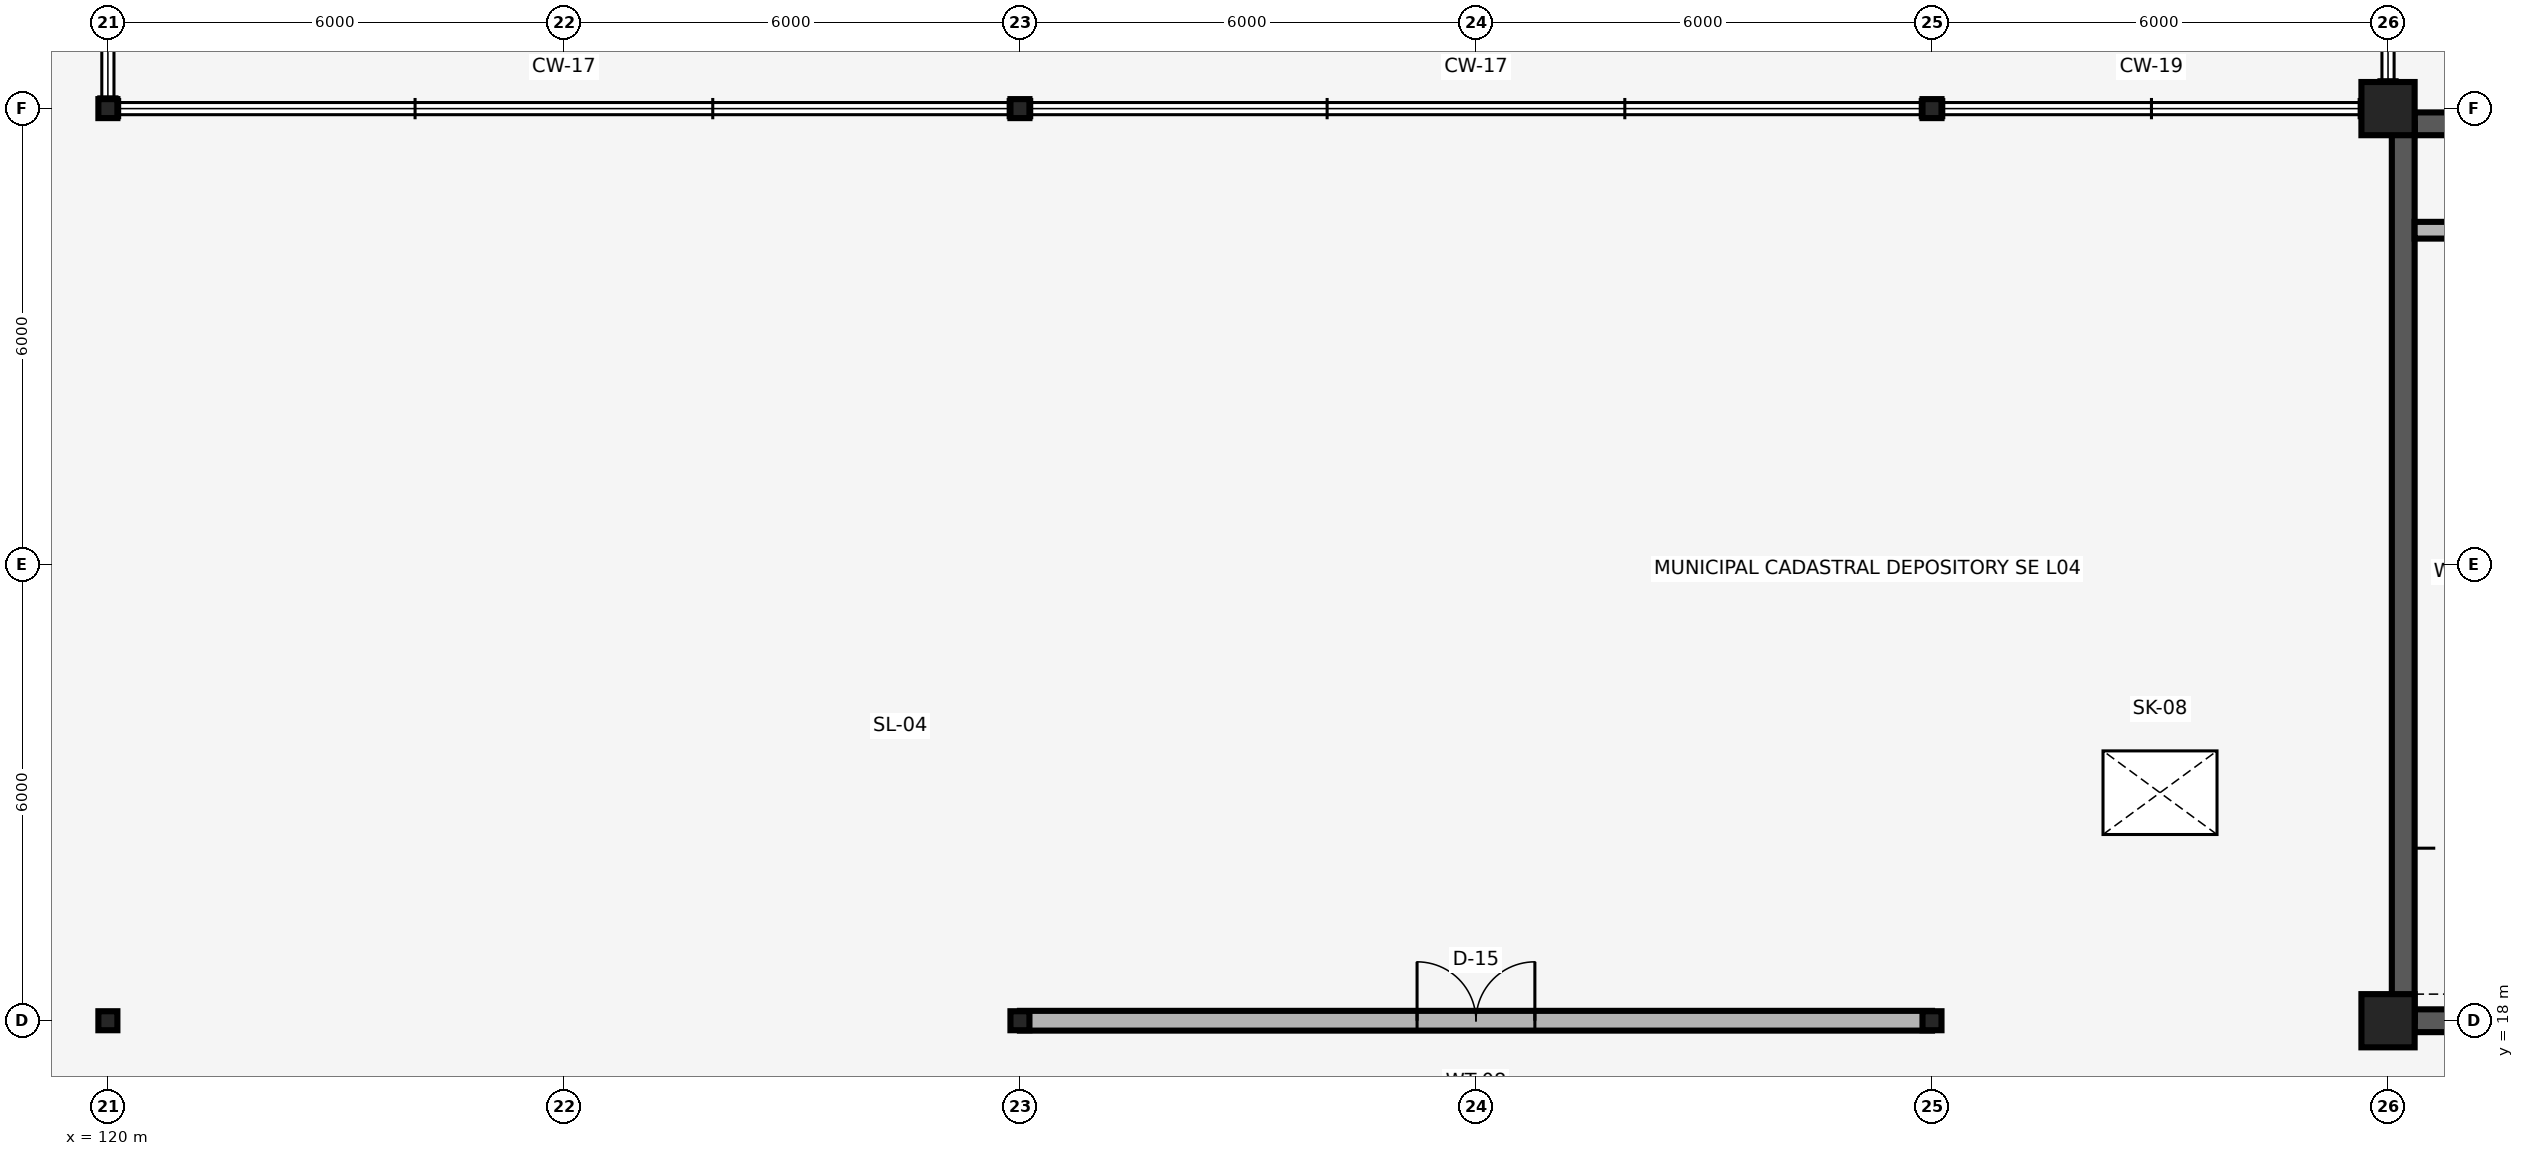
"""IFC4 building model, lengths in metres.
Left out: names, types, materials, properties, quantities, classifications, styles, units other than length and angle.
Written with IfcOpenShell. Run it as: python <this file> out.ifc"""

import sys

from ifc_helpers import new_model, si_unit, direction, frame, frame_2d, origin, origin_2d, place, context, subcontext, project, spatial, rectangle, i_section, extrude, element, fill, save


model = new_model("IFC4")
c1 = context("Model", 3, precision=1e-05, world=origin(), true_north=direction((0.0, 1.0)))
c2 = subcontext(c1, "Body", "Model", "MODEL_VIEW")
j1 = project(units=[si_unit("LENGTHUNIT", "METRE"), si_unit("PLANEANGLEUNIT", "RADIAN")], contexts=[c1])
p1 = place(None, origin())
s1 = spatial("IfcSite", under=j1, at=p1, CompositionType="ELEMENT")
p2 = place(p1, origin())
s2 = spatial("IfcBuilding", under=s1, at=p2, CompositionType="ELEMENT")
p3 = place(p2, frame((0.0, 0.0, 16.5)))
s3 = spatial("IfcBuildingStorey", under=s2, at=p3, CompositionType="ELEMENT", Elevation=16.5)
for number, where, z_axis, x_axis in (
    (1, (120.0, 18.0, 0.0), (0.0, 0.0, 1.0), (1.0, 0.0, 0.0)),
    (2, (132.0, 18.0, 0.0), (0.0, 0.0, 1.0), (1.0, 0.0, 0.0)),
    (3, (144.0, 18.0, 0.0), (0.0, 0.0, 1.0), (1.0, 0.0, 0.0)),
):
    element("IfcColumn", number, at=place(p3, frame(where, z_axis=z_axis, x_axis=x_axis)), inside=s3, PredefinedType="COLUMN", context=c2, shape_type="SweptSolid", body=[
        extrude(i_section(OverallWidth=0.25, OverallDepth=0.25, WebThickness=0.009, FlangeThickness=0.014, FilletRadius=0.016, at=origin_2d()), origin(), (0.0, 0.0, 1.0), 4.0),
    ])
p4 = place(p3, frame((150.0, 18.0, 0.0), z_axis=(0.0, 0.0, 1.0), x_axis=(1.0, 0.0, 0.0)))
e4 = element("IfcColumn", 4, at=p4, inside=s3, PredefinedType="COLUMN", context=c2, shape_type="SweptSolid", body=[
    extrude(rectangle(XDim=0.7, YDim=0.7, at=origin_2d()), origin(), (0.0, 0.0, 1.0), 4.0),
])
for number, where, z_axis, x_axis in (
    (5, (120.0, 30.0, 0.0), (0.0, 0.0, 1.0), (1.0, 0.0, 0.0)),
    (6, (132.0, 30.0, 0.0), (0.0, 0.0, 1.0), (1.0, 0.0, 0.0)),
    (7, (144.0, 30.0, 0.0), (0.0, 0.0, 1.0), (1.0, 0.0, 0.0)),
):
    element("IfcColumn", number, at=place(p3, frame(where, z_axis=z_axis, x_axis=x_axis)), inside=s3, PredefinedType="COLUMN", context=c2, shape_type="SweptSolid", body=[
        extrude(i_section(OverallWidth=0.25, OverallDepth=0.25, WebThickness=0.009, FlangeThickness=0.014, FilletRadius=0.016, at=origin_2d()), origin(), (0.0, 0.0, 1.0), 4.0),
    ])
p5 = place(p3, frame((150.0, 30.0, 0.0), z_axis=(0.0, 0.0, 1.0), x_axis=(1.0, 0.0, 0.0)))
e8 = element("IfcColumn", 8, at=p5, inside=s3, PredefinedType="COLUMN", context=c2, shape_type="SweptSolid", body=[
    extrude(rectangle(XDim=0.7, YDim=0.7, at=origin_2d()), origin(), (0.0, 0.0, 1.0), 4.0),
])
p6 = place(p3, frame((150.35, 18.0, 0.0), z_axis=(0.0, 0.0, 1.0), x_axis=(1.0, 0.0, 0.0)))
e9 = element("IfcWall", 9, at=p6, inside=s3, PredefinedType="SHEAR", context=c2, shape_type="SweptSolid", body=[
    extrude(rectangle(XDim=5.3, YDim=0.3, at=frame_2d((2.65, 0.0))), origin(), (0.0, 0.0, 1.0), 4.0),
])
p7 = place(p6, frame((1.925, 0.0, 0.0)))
e10 = element("IfcOpeningElement", 10, at=p7, cuts=e9, PredefinedType="OPENING", context=c2, shape_type="SweptSolid", body=[
    extrude(rectangle(XDim=1.45, YDim=2.25, at=frame_2d((0.725, 1.125))), frame((0.0, 0.165, 0.0), z_axis=(0.0, -1.0, 0.0), x_axis=(1.0, 0.0, 0.0)), (0.0, 0.0, 1.0), 0.33),
])
p8 = place(p3, frame((150.35, 29.8, 0.0), z_axis=(0.0, 0.0, 1.0), x_axis=(1.0, 0.0, 0.0)))
e11 = element("IfcWall", 11, at=p8, inside=s3, PredefinedType="SHEAR", context=c2, shape_type="SweptSolid", body=[
    extrude(rectangle(XDim=5.3, YDim=0.3, at=frame_2d((2.65, 0.0))), origin(), (0.0, 0.0, 1.0), 4.0),
])
p9 = place(p3, frame((150.2, 18.0, 0.0), z_axis=(0.0, 0.0, 1.0), x_axis=(0.0, 1.0, 0.0)))
e12 = element("IfcWall", 12, at=p9, inside=s3, PredefinedType="SHEAR", context=c2, shape_type="SweptSolid", body=[
    extrude(rectangle(XDim=11.8, YDim=0.3, at=frame_2d((5.9, 0.0))), origin(), (0.0, 0.0, 1.0), 4.0),
])
p10 = place(p3, frame((150.35, 28.4, 0.0), z_axis=(0.0, 0.0, 1.0), x_axis=(1.0, 0.0, 0.0)))
e13 = element("IfcWall", 13, at=p10, inside=s3, PredefinedType="PARTITIONING", context=c2, shape_type="SweptSolid", body=[
    extrude(rectangle(XDim=1.1, YDim=0.22, at=frame_2d((0.55, 0.0))), origin(), (0.0, 0.0, 1.0), 4.0),
])
p11 = place(p3, frame((132.0, 18.0, 0.0), z_axis=(0.0, 0.0, 1.0), x_axis=(1.0, 0.0, 0.0)))
e14 = element("IfcWall", 14, at=p11, inside=s3, PredefinedType="PARTITIONING", context=c2, shape_type="SweptSolid", body=[
    extrude(rectangle(XDim=12.0, YDim=0.26, at=frame_2d((6.0, 0.0))), origin(), (0.0, 0.0, 1.0), 3.513),
])
p12 = place(p11, frame((5.225, 0.0, 0.0)))
e15 = element("IfcOpeningElement", 15, at=p12, cuts=e14, PredefinedType="OPENING", context=c2, shape_type="SweptSolid", body=[
    extrude(rectangle(XDim=1.55, YDim=2.3, at=frame_2d((0.775, 1.15))), frame((0.0, 0.145, 0.0), z_axis=(0.0, -1.0, 0.0), x_axis=(1.0, 0.0, 0.0)), (0.0, 0.0, 1.0), 0.29),
])
p13 = place(p3, frame((0.0, 0.0, 4.0)))
p14 = place(p13, frame((147.0, 21.0, 0.0)))
p15 = place(p14, frame((0.0, 0.0, 0.15)))
e16 = element("IfcWindow", 16, at=p15, inside=s3, PartitioningType="SINGLE_PANEL", PredefinedType="SKYLIGHT", context=c2, shape_type="SweptSolid", body=[
    extrude(rectangle(XDim=1.5, YDim=1.1, at=origin_2d()), origin(), (0.0, 0.0, 1.0), 0.05),
])
p16 = place(p12, origin())
e17 = element("IfcDoor", 17, at=p16, inside=s3, OperationType="DOUBLE_DOOR_SINGLE_SWING", PredefinedType="DOOR", context=c2, shape_type="SweptSolid", body=[
    extrude(rectangle(XDim=1.55, YDim=2.3, at=frame_2d((0.775, 1.15))), frame((0.0, 0.025, 0.0), z_axis=(0.0, -1.0, 0.0), x_axis=(1.0, 0.0, 0.0)), (0.0, 0.0, 1.0), 0.05),
])
fill(e15, e17)
save(model, sys.argv[1])
